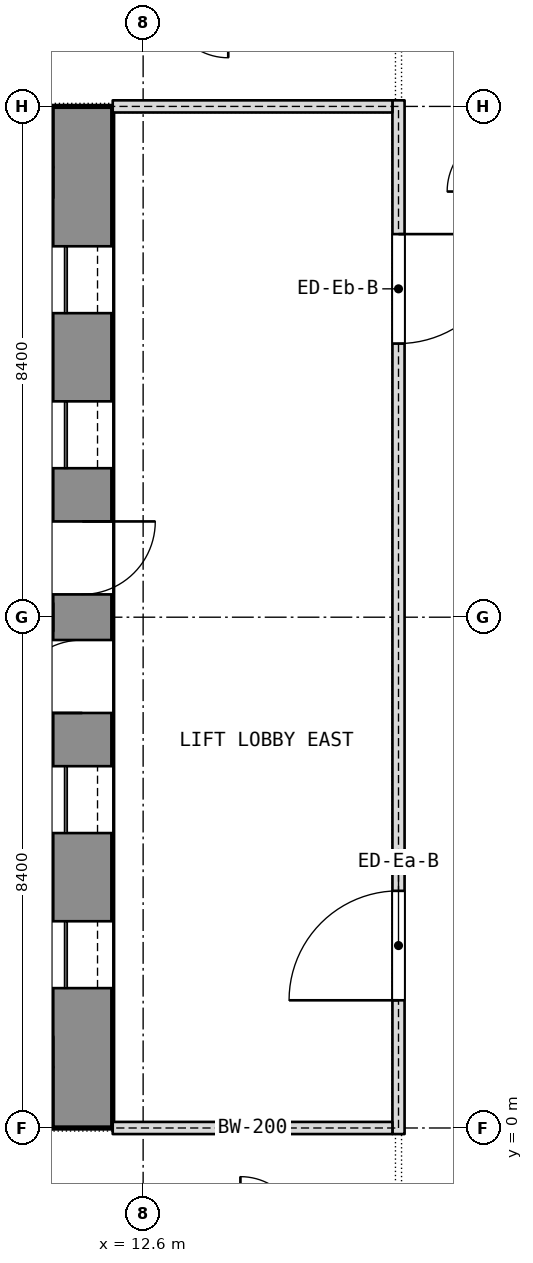
"""IFC4 building model, lengths in metres.
Left out: names, types, materials, properties, quantities, classifications, styles, units other than length and angle.
Written with IfcOpenShell. Run it as: python <this file> out.ifc"""

import sys

from ifc_helpers import new_model, si_unit, direction, frame, frame_2d, origin, place, context, subcontext, project, spatial, rectangle, extrude, element, fill, save


model = new_model("IFC4")
c1 = context("Model", 3, precision=1e-05, world=origin(), true_north=direction((0.0, 1.0)))
c2 = subcontext(c1, "Body", "Model", "MODEL_VIEW")
j1 = project(units=[si_unit("LENGTHUNIT", "METRE"), si_unit("PLANEANGLEUNIT", "RADIAN")], contexts=[c1])
p1 = place(None, origin())
s1 = spatial("IfcSite", under=j1, at=p1, CompositionType="ELEMENT")
p2 = place(p1, origin())
s2 = spatial("IfcBuilding", under=s1, at=p2, CompositionType="ELEMENT")
p3 = place(p2, frame((0.0, 0.0, 140.9)))
s3 = spatial("IfcBuildingStorey", under=s2, at=p3, CompositionType="ELEMENT", Elevation=140.9)
p4 = place(p3, frame((11.6, 0.0, 0.0), z_axis=(0.0, 0.0, 1.0), x_axis=(0.0, 1.0, 0.0)))
e1 = element("IfcWall", 1, at=p4, inside=s3, PredefinedType="SHEAR", context=c2, shape_type="SweptSolid", body=[
    extrude(rectangle(XDim=16.8, YDim=1.0, at=frame_2d((8.4, 0.0))), origin(), (0.0, 0.0, 1.0), 3.6),
])
p5 = place(p4, frame((2.3, 0.0, 0.0)))
e2 = element("IfcOpeningElement", 2, at=p5, cuts=e1, PredefinedType="OPENING", context=c2, shape_type="SweptSolid", body=[
    extrude(rectangle(XDim=1.1, YDim=2.1, at=frame_2d((0.55, 1.05))), frame((0.0, 0.5, 0.0), z_axis=(0.0, -1.0, 0.0), x_axis=(1.0, 0.0, 0.0)), (0.0, 0.0, 1.0), 1.0),
])
p6 = place(p4, frame((4.85, 0.0, 0.0)))
e3 = element("IfcOpeningElement", 3, at=p6, cuts=e1, PredefinedType="OPENING", context=c2, shape_type="SweptSolid", body=[
    extrude(rectangle(XDim=1.1, YDim=2.1, at=frame_2d((0.55, 1.05))), frame((0.0, 0.5, 0.0), z_axis=(0.0, -1.0, 0.0), x_axis=(1.0, 0.0, 0.0)), (0.0, 0.0, 1.0), 1.0),
])
p7 = place(p4, frame((6.825, 0.0, 0.0)))
e4 = element("IfcOpeningElement", 4, at=p7, cuts=e1, PredefinedType="OPENING", context=c2, shape_type="SweptSolid", body=[
    extrude(rectangle(XDim=1.2, YDim=2.1, at=frame_2d((0.6, 1.05))), frame((0.0, 0.5, 0.0), z_axis=(0.0, -1.0, 0.0), x_axis=(1.0, 0.0, 0.0)), (0.0, 0.0, 1.0), 1.0),
])
p8 = place(p4, frame((13.4, 0.0, 0.0)))
e5 = element("IfcOpeningElement", 5, at=p8, cuts=e1, PredefinedType="OPENING", context=c2, shape_type="SweptSolid", body=[
    extrude(rectangle(XDim=1.1, YDim=2.1, at=frame_2d((0.55, 1.05))), frame((0.0, 0.5, 0.0), z_axis=(0.0, -1.0, 0.0), x_axis=(1.0, 0.0, 0.0)), (0.0, 0.0, 1.0), 1.0),
])
p9 = place(p4, frame((10.85, 0.0, 0.0)))
e6 = element("IfcOpeningElement", 6, at=p9, cuts=e1, PredefinedType="OPENING", context=c2, shape_type="SweptSolid", body=[
    extrude(rectangle(XDim=1.1, YDim=2.1, at=frame_2d((0.55, 1.05))), frame((0.0, 0.5, 0.0), z_axis=(0.0, -1.0, 0.0), x_axis=(1.0, 0.0, 0.0)), (0.0, 0.0, 1.0), 1.0),
])
p10 = place(p4, frame((8.775, 0.0, 0.0)))
e7 = element("IfcOpeningElement", 7, at=p10, cuts=e1, PredefinedType="OPENING", context=c2, shape_type="SweptSolid", body=[
    extrude(rectangle(XDim=1.2, YDim=2.1, at=frame_2d((0.6, 1.05))), frame((0.0, 0.5, 0.0), z_axis=(0.0, -1.0, 0.0), x_axis=(1.0, 0.0, 0.0)), (0.0, 0.0, 1.0), 1.0),
])
p11 = place(p3, frame((16.8, -0.1, 0.0), z_axis=(0.0, 0.0, 1.0), x_axis=(0.0, 1.0, 0.0)))
e8 = element("IfcWall", 8, at=p11, inside=s3, PredefinedType="PARTITIONING", context=c2, shape_type="SweptSolid", body=[
    extrude(rectangle(XDim=17.0, YDim=0.2, at=frame_2d((8.5, 0.0))), origin(), (0.0, 0.0, 1.0), 3.34),
])
p12 = place(p11, frame((2.2, 0.0, 0.0)))
e9 = element("IfcOpeningElement", 9, at=p12, cuts=e8, PredefinedType="OPENING", context=c2, shape_type="SweptSolid", body=[
    extrude(rectangle(XDim=1.8, YDim=2.1, at=frame_2d((0.9, 1.05))), frame((0.0, 0.1, 0.0), z_axis=(0.0, -1.0, 0.0), x_axis=(1.0, 0.0, 0.0)), (0.0, 0.0, 1.0), 0.2),
])
p13 = place(p11, frame((13.0, 0.0, 0.0)))
e10 = element("IfcOpeningElement", 10, at=p13, cuts=e8, PredefinedType="OPENING", context=c2, shape_type="SweptSolid", body=[
    extrude(rectangle(XDim=1.8, YDim=2.1, at=frame_2d((0.9, 1.05))), frame((0.0, 0.1, 0.0), z_axis=(0.0, -1.0, 0.0), x_axis=(1.0, 0.0, 0.0)), (0.0, 0.0, 1.0), 0.2),
])
for number, where, z_axis, x_axis in (
    (11, (12.1, 0.0, 0.0), (0.0, 0.0, 1.0), (1.0, 0.0, 0.0)),
    (12, (12.1, 16.8, 0.0), (0.0, 0.0, 1.0), (1.0, 0.0, 0.0)),
):
    element("IfcWall", number, at=place(p3, frame(where, z_axis=z_axis, x_axis=x_axis)), inside=s3, PredefinedType="PARTITIONING", context=c2, shape_type="SweptSolid", body=[
        extrude(rectangle(XDim=4.6, YDim=0.2, at=frame_2d((2.3, 0.0))), origin(), (0.0, 0.0, 1.0), 2.89),
    ])
p14 = place(p5, origin())
e13 = element("IfcDoor", 13, at=p14, inside=s3, OperationType="SLIDING_TO_LEFT", PredefinedType="DOOR", context=c2, shape_type="SweptSolid", body=[
    extrude(rectangle(XDim=1.1, YDim=2.1, at=frame_2d((0.55, 1.05))), frame((0.0, 0.025, 0.0), z_axis=(0.0, -1.0, 0.0), x_axis=(1.0, 0.0, 0.0)), (0.0, 0.0, 1.0), 0.05),
])
fill(e2, e13)
p15 = place(p6, origin())
e14 = element("IfcDoor", 14, at=p15, inside=s3, OperationType="SLIDING_TO_LEFT", PredefinedType="DOOR", context=c2, shape_type="SweptSolid", body=[
    extrude(rectangle(XDim=1.1, YDim=2.1, at=frame_2d((0.55, 1.05))), frame((0.0, 0.025, 0.0), z_axis=(0.0, -1.0, 0.0), x_axis=(1.0, 0.0, 0.0)), (0.0, 0.0, 1.0), 0.05),
])
fill(e3, e14)
p16 = place(p7, origin())
e15 = element("IfcDoor", 15, at=p16, inside=s3, OperationType="SINGLE_SWING_LEFT", PredefinedType="DOOR", context=c2, shape_type="SweptSolid", body=[
    extrude(rectangle(XDim=1.2, YDim=2.1, at=frame_2d((0.6, 1.05))), frame((0.0, 0.025, 0.0), z_axis=(0.0, -1.0, 0.0), x_axis=(1.0, 0.0, 0.0)), (0.0, 0.0, 1.0), 0.05),
])
fill(e4, e15)
p17 = place(p8, origin())
e16 = element("IfcDoor", 16, at=p17, inside=s3, OperationType="SLIDING_TO_LEFT", PredefinedType="DOOR", context=c2, shape_type="SweptSolid", body=[
    extrude(rectangle(XDim=1.1, YDim=2.1, at=frame_2d((0.55, 1.05))), frame((0.0, 0.025, 0.0), z_axis=(0.0, -1.0, 0.0), x_axis=(1.0, 0.0, 0.0)), (0.0, 0.0, 1.0), 0.05),
])
fill(e5, e16)
p18 = place(p9, origin())
e17 = element("IfcDoor", 17, at=p18, inside=s3, OperationType="SLIDING_TO_LEFT", PredefinedType="DOOR", context=c2, shape_type="SweptSolid", body=[
    extrude(rectangle(XDim=1.1, YDim=2.1, at=frame_2d((0.55, 1.05))), frame((0.0, 0.025, 0.0), z_axis=(0.0, -1.0, 0.0), x_axis=(1.0, 0.0, 0.0)), (0.0, 0.0, 1.0), 0.05),
])
fill(e6, e17)
p19 = place(p10, origin())
e18 = element("IfcDoor", 18, at=p19, inside=s3, OperationType="SINGLE_SWING_LEFT", PredefinedType="DOOR", context=c2, shape_type="SweptSolid", body=[
    extrude(rectangle(XDim=1.2, YDim=2.1, at=frame_2d((0.6, 1.05))), frame((0.0, 0.025, 0.0), z_axis=(0.0, -1.0, 0.0), x_axis=(1.0, 0.0, 0.0)), (0.0, 0.0, 1.0), 0.05),
])
fill(e7, e18)
p20 = place(p12, origin())
e19 = element("IfcDoor", 19, at=p20, inside=s3, OperationType="DOUBLE_DOOR_SINGLE_SWING", PredefinedType="DOOR", context=c2, shape_type="SweptSolid", body=[
    extrude(rectangle(XDim=1.8, YDim=2.1, at=frame_2d((0.9, 1.05))), frame((0.0, 0.025, 0.0), z_axis=(0.0, -1.0, 0.0), x_axis=(1.0, 0.0, 0.0)), (0.0, 0.0, 1.0), 0.05),
])
fill(e9, e19)
p21 = place(p13, origin())
e20 = element("IfcDoor", 20, at=p21, inside=s3, OperationType="DOUBLE_DOOR_SINGLE_SWING", PredefinedType="DOOR", context=c2, shape_type="SweptSolid", body=[
    extrude(rectangle(XDim=1.8, YDim=2.1, at=frame_2d((0.9, 1.05))), frame((0.0, 0.025, 0.0), z_axis=(0.0, -1.0, 0.0), x_axis=(1.0, 0.0, 0.0)), (0.0, 0.0, 1.0), 0.05),
])
fill(e10, e20)
save(model, sys.argv[1])
